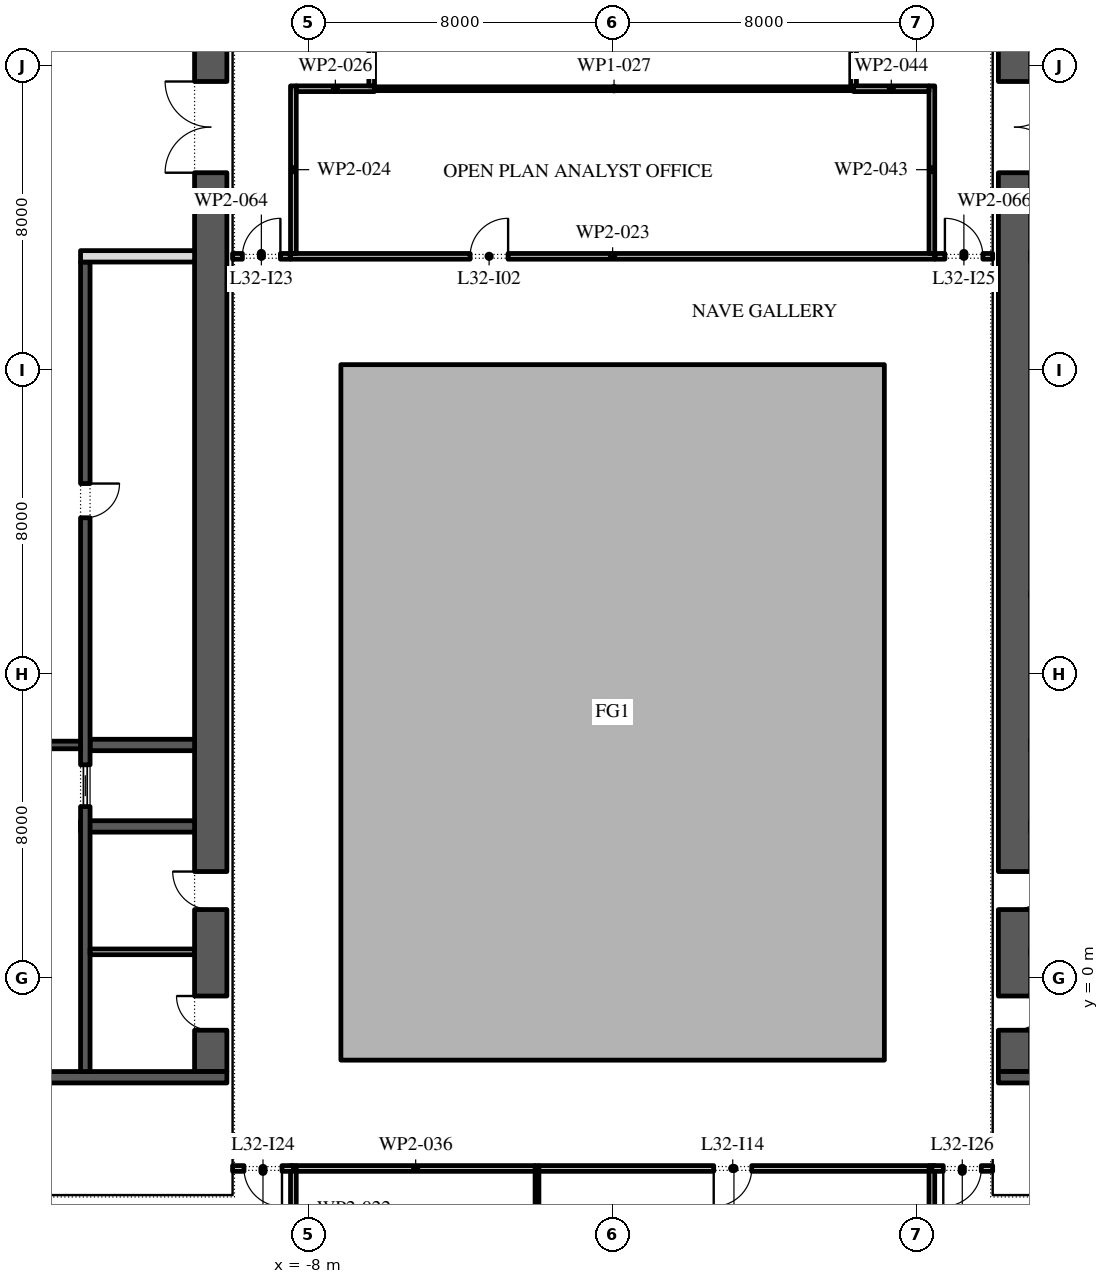
"""IFC4 building model, lengths in metres.
Left out: names, types, materials, properties, quantities, classifications, styles, units other than length and angle.
Written with IfcOpenShell. Run it as: python <this file> out.ifc"""

import sys

from ifc_helpers import new_model, si_unit, direction, frame, frame_2d, origin, place, context, subcontext, project, spatial, polyline, rectangle, outline, extrude, element, fill, save


model = new_model("IFC4")
c1 = context("Model", 3, precision=1e-05, world=origin(), true_north=direction((0.0, 1.0)))
c2 = subcontext(c1, "Body", "Model", "MODEL_VIEW")
j1 = project(units=[si_unit("LENGTHUNIT", "METRE"), si_unit("PLANEANGLEUNIT", "RADIAN")], contexts=[c1])
p1 = place(None, origin())
s1 = spatial("IfcSite", under=j1, at=p1, CompositionType="ELEMENT")
p2 = place(p1, origin())
s2 = spatial("IfcBuilding", under=s1, at=p2, CompositionType="ELEMENT")
p3 = place(p2, frame((0.0, 0.0, 147.6)))
s3 = spatial("IfcBuildingStorey", under=s2, at=p3, CompositionType="ELEMENT", Elevation=147.6)
p4 = place(p3, origin())
e1 = element("IfcWall", 1, at=p4, inside=s3, PredefinedType="STANDARD", context=c2, shape_type="SweptSolid", body=[
    extrude(outline(polyline([(-7.15, -2.15), (7.15, -2.15), (7.15, 16.15), (-7.15, 16.15), (-7.15, -2.15)]), holes=[polyline([(-7.0, -2.0), (-7.0, 16.0), (7.0, 16.0), (7.0, -2.0), (-7.0, -2.0)])]), origin(), (0.0, 0.0, 1.0), 4.0),
])
p5 = place(p3, frame((-10.575, -2.45, 0.0), z_axis=(0.0, 0.0, 1.0), x_axis=(0.0, 1.0, 0.0)))
e2 = element("IfcWall", 2, at=p5, inside=s3, PredefinedType="SHEAR", context=c2, shape_type="SweptSolid", body=[
    extrude(rectangle(XDim=27.9, YDim=0.85, at=frame_2d((13.95, 0.0))), origin(), (0.0, 0.0, 1.0), 4.0),
])
p6 = place(p5, frame((23.65, 0.0, 0.0)))
e3 = element("IfcOpeningElement", 3, at=p6, cuts=e2, PredefinedType="OPENING", context=c2, shape_type="SweptSolid", body=[
    extrude(rectangle(XDim=2.4, YDim=2.1, at=frame_2d((1.2, 1.05))), frame((0.0, 0.435, 0.0), z_axis=(0.0, -1.0, 0.0), x_axis=(1.0, 0.0, 0.0)), (0.0, 0.0, 1.0), 0.87),
])
p7 = place(p5, frame((1.087, 0.0, 0.0)))
e4 = element("IfcOpeningElement", 4, at=p7, cuts=e2, PredefinedType="OPENING", context=c2, shape_type="SweptSolid", body=[
    extrude(rectangle(XDim=0.9, YDim=2.1, at=frame_2d((0.45, 1.05))), frame((0.0, 0.435, 0.0), z_axis=(0.0, -1.0, 0.0), x_axis=(1.0, 0.0, 0.0)), (0.0, 0.0, 1.0), 0.87),
])
p8 = place(p5, frame((4.262, 0.0, 0.0)))
e5 = element("IfcOpeningElement", 5, at=p8, cuts=e2, PredefinedType="OPENING", context=c2, shape_type="SweptSolid", body=[
    extrude(rectangle(XDim=1.0, YDim=2.1, at=frame_2d((0.5, 1.05))), frame((0.0, 0.435, 0.0), z_axis=(0.0, -1.0, 0.0), x_axis=(1.0, 0.0, 0.0)), (0.0, 0.0, 1.0), 0.87),
])
p9 = place(p3, frame((-21.85, -2.6, 0.0), z_axis=(0.0, 0.0, 1.0), x_axis=(1.0, 0.0, 0.0)))
e6 = element("IfcWall", 6, at=p9, inside=s3, PredefinedType="SHEAR", context=c2, shape_type="SweptSolid", body=[
    extrude(rectangle(XDim=11.7, YDim=0.3, at=frame_2d((5.85, 0.0))), origin(), (0.0, 0.0, 1.0), 4.0),
])
p10 = place(p3, frame((-14.0, 4.0, 0.0), z_axis=(0.0, 0.0, 1.0), x_axis=(1.0, 0.0, 0.0)))
e7 = element("IfcWall", 7, at=p10, inside=s3, PredefinedType="SHEAR", context=c2, shape_type="SweptSolid", body=[
    extrude(rectangle(XDim=3.0, YDim=0.3, at=frame_2d((1.5, 0.0))), origin(), (0.0, 0.0, 1.0), 4.0),
])
p11 = place(p3, frame((-13.75, 6.143, 0.0), z_axis=(0.0, 0.0, 1.0), x_axis=(1.0, 0.0, 0.0)))
e8 = element("IfcWall", 8, at=p11, inside=s3, PredefinedType="SHEAR", context=c2, shape_type="SweptSolid", body=[
    extrude(rectangle(XDim=2.75, YDim=0.3, at=frame_2d((1.375, 0.0))), origin(), (0.0, 0.0, 1.0), 4.0),
])
p12 = place(p3, frame((-13.875, -2.45, 0.0), z_axis=(0.0, 0.0, 1.0), x_axis=(0.0, 1.0, 0.0)))
e9 = element("IfcWall", 9, at=p12, inside=s3, PredefinedType="SHEAR", context=c2, shape_type="SweptSolid", body=[
    extrude(rectangle(XDim=21.3, YDim=0.25, at=frame_2d((10.65, 0.0))), origin(), (0.0, 0.0, 1.0), 4.0),
])
p13 = place(p12, frame((14.571, 0.0, 0.0)))
e10 = element("IfcOpeningElement", 10, at=p13, cuts=e9, PredefinedType="OPENING", context=c2, shape_type="SweptSolid", body=[
    extrude(rectangle(XDim=0.9, YDim=2.1, at=frame_2d((0.45, 1.05))), frame((0.0, 0.135, 0.0), z_axis=(0.0, -1.0, 0.0), x_axis=(1.0, 0.0, 0.0)), (0.0, 0.0, 1.0), 0.27),
])
p14 = place(p12, frame((6.971, 0.0, 0.0)))
e11 = element("IfcOpeningElement", 11, at=p14, cuts=e9, PredefinedType="OPENING", context=c2, shape_type="SweptSolid", body=[
    extrude(rectangle(XDim=1.1, YDim=2.1, at=frame_2d((0.55, 1.05))), frame((0.0, 0.135, 0.0), z_axis=(0.0, -1.0, 0.0), x_axis=(1.0, 0.0, 0.0)), (0.0, 0.0, 1.0), 0.27),
])
p15 = place(p3, frame((-14.0, 19.0, 0.0), z_axis=(0.0, 0.0, 1.0), x_axis=(1.0, 0.0, 0.0)))
e12 = element("IfcWall", 12, at=p15, inside=s3, PredefinedType="PARTITIONING", context=c2, shape_type="SweptSolid", body=[
    extrude(rectangle(XDim=3.0, YDim=0.3, at=frame_2d((1.5, 0.0))), origin(), (0.0, 0.0, 1.0), 4.0),
])
p16 = place(p3, frame((-18.0, 6.143, 0.0), z_axis=(0.0, 0.0, 1.0), x_axis=(1.0, 0.0, 0.0)))
e13 = element("IfcWall", 13, at=p16, inside=s3, PredefinedType="SHEAR", context=c2, shape_type="SweptSolid", body=[
    extrude(rectangle(XDim=4.0, YDim=0.2, at=frame_2d((2.0, 0.0))), origin(), (0.0, 0.0, 1.0), 4.0),
])
p17 = place(p16, frame((1.4, 0.0, 0.0)))
e14 = element("IfcOpeningElement", 14, at=p17, cuts=e13, PredefinedType="OPENING", context=c2, shape_type="SweptSolid", body=[
    extrude(rectangle(XDim=1.2, YDim=2.1, at=frame_2d((0.6, 1.05))), frame((0.0, 0.11, 0.0), z_axis=(0.0, -1.0, 0.0), x_axis=(1.0, 0.0, 0.0)), (0.0, 0.0, 1.0), 0.22),
])
p18 = place(p3, frame((-13.75, 0.7, 0.0), z_axis=(0.0, 0.0, 1.0), x_axis=(1.0, 0.0, 0.0)))
e15 = element("IfcWall", 15, at=p18, inside=s3, PredefinedType="PARTITIONING", context=c2, shape_type="SweptSolid", body=[
    extrude(rectangle(XDim=2.75, YDim=0.15, at=frame_2d((1.375, 0.0))), origin(), (0.0, 0.0, 1.0), 4.0),
])
p19 = place(p3, frame((10.575, -2.45, 0.0), z_axis=(0.0, 0.0, 1.0), x_axis=(0.0, 1.0, 0.0)))
e16 = element("IfcWall", 16, at=p19, inside=s3, PredefinedType="SHEAR", context=c2, shape_type="SweptSolid", body=[
    extrude(rectangle(XDim=27.9, YDim=0.85, at=frame_2d((13.95, 0.0))), origin(), (0.0, 0.0, 1.0), 4.0),
])
p20 = place(p19, frame((23.65, 0.0, 0.0)))
e17 = element("IfcOpeningElement", 17, at=p20, cuts=e16, PredefinedType="OPENING", context=c2, shape_type="SweptSolid", body=[
    extrude(rectangle(XDim=2.4, YDim=2.1, at=frame_2d((1.2, 1.05))), frame((0.0, 0.435, 0.0), z_axis=(0.0, -1.0, 0.0), x_axis=(1.0, 0.0, 0.0)), (0.0, 0.0, 1.0), 0.87),
])
p21 = place(p19, frame((1.087, 0.0, 0.0)))
e18 = element("IfcOpeningElement", 18, at=p21, cuts=e16, PredefinedType="OPENING", context=c2, shape_type="SweptSolid", body=[
    extrude(rectangle(XDim=0.9, YDim=2.1, at=frame_2d((0.45, 1.05))), frame((0.0, 0.435, 0.0), z_axis=(0.0, -1.0, 0.0), x_axis=(1.0, 0.0, 0.0)), (0.0, 0.0, 1.0), 0.87),
])
p22 = place(p19, frame((4.262, 0.0, 0.0)))
e19 = element("IfcOpeningElement", 19, at=p22, cuts=e16, PredefinedType="OPENING", context=c2, shape_type="SweptSolid", body=[
    extrude(rectangle(XDim=1.0, YDim=2.1, at=frame_2d((0.5, 1.05))), frame((0.0, 0.435, 0.0), z_axis=(0.0, -1.0, 0.0), x_axis=(1.0, 0.0, 0.0)), (0.0, 0.0, 1.0), 0.87),
])
p23 = place(p3, frame((10.15, -2.6, 0.0), z_axis=(0.0, 0.0, 1.0), x_axis=(1.0, 0.0, 0.0)))
e20 = element("IfcWall", 20, at=p23, inside=s3, PredefinedType="SHEAR", context=c2, shape_type="SweptSolid", body=[
    extrude(rectangle(XDim=11.7, YDim=0.3, at=frame_2d((5.85, 0.0))), origin(), (0.0, 0.0, 1.0), 4.0),
])
p24 = place(p3, frame((-8.4, -4.925, 0.0), z_axis=(0.0, 0.0, 1.0), x_axis=(0.0, -1.0, 0.0)))
e21 = element("IfcWall", 21, at=p24, inside=s3, PredefinedType="PARTITIONING", context=c2, shape_type="SweptSolid", body=[
    extrude(rectangle(XDim=2.3, YDim=0.15, at=frame_2d((1.15, 0.0))), origin(), (0.0, 0.0, 1.0), 4.0),
])
p25 = place(p3, frame((-8.475, 19.0, 0.0), z_axis=(0.0, 0.0, 1.0), x_axis=(1.0, 0.0, 0.0)))
e22 = element("IfcWall", 22, at=p25, inside=s3, PredefinedType="PARTITIONING", context=c2, shape_type="SweptSolid", body=[
    extrude(rectangle(XDim=16.95, YDim=0.15, at=frame_2d((8.475, 0.0))), origin(), (0.0, 0.0, 1.0), 4.0),
])
p26 = place(p25, frame((4.725, 0.0, 0.0)))
e23 = element("IfcOpeningElement", 23, at=p26, cuts=e22, PredefinedType="OPENING", context=c2, shape_type="SweptSolid", body=[
    extrude(rectangle(XDim=1.0, YDim=2.1, at=frame_2d((0.5, 1.05))), frame((0.0, 0.085, 0.0), z_axis=(0.0, -1.0, 0.0), x_axis=(1.0, 0.0, 0.0)), (0.0, 0.0, 1.0), 0.17),
])
p27 = place(p3, frame((-8.4, 23.485, 0.0), z_axis=(0.0, 0.0, 1.0), x_axis=(0.0, -1.0, 0.0)))
e24 = element("IfcWall", 24, at=p27, inside=s3, PredefinedType="PARTITIONING", context=c2, shape_type="SweptSolid", body=[
    extrude(rectangle(XDim=4.41, YDim=0.15, at=frame_2d((2.205, 0.0))), origin(), (0.0, 0.0, 1.0), 4.0),
])
p28 = place(p3, frame((-6.265, 23.41, 0.0), z_axis=(0.0, 0.0, 1.0), x_axis=(-1.0, 0.0, 0.0)))
e25 = element("IfcWall", 25, at=p28, inside=s3, PredefinedType="PARTITIONING", context=c2, shape_type="SweptSolid", body=[
    extrude(rectangle(XDim=2.06, YDim=0.15, at=frame_2d((1.03, 0.0))), origin(), (0.0, 0.0, 1.0), 4.0),
])
p29 = place(p3, frame((-6.265, 23.41, 0.0), z_axis=(0.0, 0.0, 1.0), x_axis=(1.0, 0.0, 0.0)))
e26 = element("IfcWall", 26, at=p29, inside=s3, PredefinedType="PARTITIONING", context=c2, shape_type="SweptSolid", body=[
    extrude(rectangle(XDim=12.605, YDim=0.1, at=frame_2d((6.302, 0.0))), origin(), (0.0, 0.0, 1.0), 4.0),
])
p30 = place(p3, frame((-6.34, 26.965, 0.0), z_axis=(0.0, 0.0, 1.0), x_axis=(0.0, -1.0, 0.0)))
e27 = element("IfcWall", 27, at=p30, inside=s3, PredefinedType="PARTITIONING", context=c2, shape_type="SweptSolid", body=[
    extrude(rectangle(XDim=3.48, YDim=0.15, at=frame_2d((1.74, 0.0))), origin(), (0.0, 0.0, 1.0), 4.0),
])
p31 = place(p30, frame((0.905, 0.0, 0.0)))
e28 = element("IfcOpeningElement", 28, at=p31, cuts=e27, PredefinedType="OPENING", context=c2, shape_type="SweptSolid", body=[
    extrude(rectangle(XDim=1.0, YDim=2.1, at=frame_2d((0.5, 1.05))), frame((0.0, 0.085, 0.0), z_axis=(0.0, -1.0, 0.0), x_axis=(1.0, 0.0, 0.0)), (0.0, 0.0, 1.0), 0.17),
])
p32 = place(p3, frame((-1.99, -11.2, 0.0), z_axis=(0.0, 0.0, 1.0), x_axis=(0.0, 1.0, 0.0)))
e29 = element("IfcWall", 29, at=p32, inside=s3, PredefinedType="PARTITIONING", context=c2, shape_type="SweptSolid", body=[
    extrude(rectangle(XDim=6.275, YDim=0.1, at=frame_2d((3.137, 0.0))), origin(), (0.0, 0.0, 1.0), 3.02),
])
p33 = place(p3, frame((-2.04, -5.0, 0.0), z_axis=(0.0, 0.0, 1.0), x_axis=(-1.0, 0.0, 0.0)))
e30 = element("IfcWall", 30, at=p33, inside=s3, PredefinedType="PARTITIONING", context=c2, shape_type="SweptSolid", body=[
    extrude(rectangle(XDim=6.285, YDim=0.15, at=frame_2d((3.143, 0.0))), origin(), (0.0, 0.0, 1.0), 4.0),
])
p34 = place(p3, frame((6.34, 23.46, 0.0), z_axis=(0.0, 0.0, 1.0), x_axis=(0.0, 1.0, 0.0)))
e31 = element("IfcWall", 31, at=p34, inside=s3, PredefinedType="PARTITIONING", context=c2, shape_type="SweptSolid", body=[
    extrude(rectangle(XDim=3.655, YDim=0.15, at=frame_2d((1.828, 0.0))), origin(), (0.0, 0.0, 1.0), 4.0),
])
p35 = place(p3, frame((8.4, -7.375, 0.0), z_axis=(0.0, 0.0, 1.0), x_axis=(0.0, 1.0, 0.0)))
e32 = element("IfcWall", 32, at=p35, inside=s3, PredefinedType="PARTITIONING", context=c2, shape_type="SweptSolid", body=[
    extrude(rectangle(XDim=2.45, YDim=0.15, at=frame_2d((1.225, 0.0))), origin(), (0.0, 0.0, 1.0), 4.0),
])
p36 = place(p3, frame((8.325, -5.0, 0.0), z_axis=(0.0, 0.0, 1.0), x_axis=(-1.0, 0.0, 0.0)))
e33 = element("IfcWall", 33, at=p36, inside=s3, PredefinedType="PARTITIONING", context=c2, shape_type="SweptSolid", body=[
    extrude(rectangle(XDim=10.265, YDim=0.15, at=frame_2d((5.132, 0.0))), origin(), (0.0, 0.0, 1.0), 4.0),
])
p37 = place(p36, frame((4.665, 0.0, 0.0)))
e34 = element("IfcOpeningElement", 34, at=p37, cuts=e33, PredefinedType="OPENING", context=c2, shape_type="SweptSolid", body=[
    extrude(rectangle(XDim=1.0, YDim=2.1, at=frame_2d((0.5, 1.05))), frame((0.0, 0.085, 0.0), z_axis=(0.0, -1.0, 0.0), x_axis=(1.0, 0.0, 0.0)), (0.0, 0.0, 1.0), 0.17),
])
p38 = place(p3, frame((8.4, 19.075, 0.0), z_axis=(0.0, 0.0, 1.0), x_axis=(0.0, 1.0, 0.0)))
e35 = element("IfcWall", 35, at=p38, inside=s3, PredefinedType="PARTITIONING", context=c2, shape_type="SweptSolid", body=[
    extrude(rectangle(XDim=4.41, YDim=0.15, at=frame_2d((2.205, 0.0))), origin(), (0.0, 0.0, 1.0), 4.0),
])
p39 = place(p3, frame((8.325, 23.41, 0.0), z_axis=(0.0, 0.0, 1.0), x_axis=(-1.0, 0.0, 0.0)))
e36 = element("IfcWall", 36, at=p39, inside=s3, PredefinedType="PARTITIONING", context=c2, shape_type="SweptSolid", body=[
    extrude(rectangle(XDim=1.985, YDim=0.15, at=frame_2d((0.992, 0.0))), origin(), (0.0, 0.0, 1.0), 4.0),
])
p40 = place(p3, frame((-10.0, 19.0, 0.0), z_axis=(0.0, 0.0, 1.0), x_axis=(1.0, 0.0, 0.0)))
e37 = element("IfcWall", 37, at=p40, inside=s3, PredefinedType="PARTITIONING", context=c2, shape_type="SweptSolid", body=[
    extrude(rectangle(XDim=1.515, YDim=0.15, at=frame_2d((0.757, 0.0))), origin(), (0.0, 0.0, 1.0), 4.0),
])
p41 = place(p40, frame((0.258, 0.0, 0.0)))
e38 = element("IfcOpeningElement", 38, at=p41, cuts=e37, PredefinedType="OPENING", context=c2, shape_type="SweptSolid", body=[
    extrude(rectangle(XDim=1.0, YDim=2.1, at=frame_2d((0.5, 1.05))), frame((0.0, 0.085, 0.0), z_axis=(0.0, -1.0, 0.0), x_axis=(1.0, 0.0, 0.0)), (0.0, 0.0, 1.0), 0.17),
])
p42 = place(p3, frame((-8.4, -5.0, 0.0), z_axis=(0.0, 0.0, 1.0), x_axis=(-1.0, 0.0, 0.0)))
e39 = element("IfcWall", 39, at=p42, inside=s3, PredefinedType="PARTITIONING", context=c2, shape_type="SweptSolid", body=[
    extrude(rectangle(XDim=1.6, YDim=0.15, at=frame_2d((0.8, 0.0))), origin(), (0.0, 0.0, 1.0), 4.0),
])
p43 = place(p42, frame((0.3, 0.0, 0.0)))
e40 = element("IfcOpeningElement", 40, at=p43, cuts=e39, PredefinedType="OPENING", context=c2, shape_type="SweptSolid", body=[
    extrude(rectangle(XDim=1.0, YDim=2.1, at=frame_2d((0.5, 1.05))), frame((0.0, 0.085, 0.0), z_axis=(0.0, -1.0, 0.0), x_axis=(1.0, 0.0, 0.0)), (0.0, 0.0, 1.0), 0.17),
])
p44 = place(p3, frame((8.485, 19.0, 0.0), z_axis=(0.0, 0.0, 1.0), x_axis=(1.0, 0.0, 0.0)))
e41 = element("IfcWall", 41, at=p44, inside=s3, PredefinedType="PARTITIONING", context=c2, shape_type="SweptSolid", body=[
    extrude(rectangle(XDim=1.515, YDim=0.15, at=frame_2d((0.757, 0.0))), origin(), (0.0, 0.0, 1.0), 4.0),
])
p45 = place(p44, frame((0.258, 0.0, 0.0)))
e42 = element("IfcOpeningElement", 42, at=p45, cuts=e41, PredefinedType="OPENING", context=c2, shape_type="SweptSolid", body=[
    extrude(rectangle(XDim=1.0, YDim=2.1, at=frame_2d((0.5, 1.05))), frame((0.0, 0.085, 0.0), z_axis=(0.0, -1.0, 0.0), x_axis=(1.0, 0.0, 0.0)), (0.0, 0.0, 1.0), 0.17),
])
p46 = place(p3, frame((10.0, -5.0, 0.0), z_axis=(0.0, 0.0, 1.0), x_axis=(-1.0, 0.0, 0.0)))
e43 = element("IfcWall", 43, at=p46, inside=s3, PredefinedType="PARTITIONING", context=c2, shape_type="SweptSolid", body=[
    extrude(rectangle(XDim=1.6, YDim=0.15, at=frame_2d((0.8, 0.0))), origin(), (0.0, 0.0, 1.0), 4.0),
])
p47 = place(p46, frame((0.3, 0.0, 0.0)))
e44 = element("IfcOpeningElement", 44, at=p47, cuts=e43, PredefinedType="OPENING", context=c2, shape_type="SweptSolid", body=[
    extrude(rectangle(XDim=1.0, YDim=2.1, at=frame_2d((0.5, 1.05))), frame((0.0, 0.085, 0.0), z_axis=(0.0, -1.0, 0.0), x_axis=(1.0, 0.0, 0.0)), (0.0, 0.0, 1.0), 0.17),
])
p48 = place(p13, frame((0.9, -0.2, 0.0), z_axis=(0.0, 0.0, 1.0), x_axis=(-1.0, 0.0, 0.0)))
e45 = element("IfcDoor", 45, at=p48, inside=s3, OperationType="SINGLE_SWING_RIGHT", PredefinedType="DOOR", context=c2, shape_type="SweptSolid", body=[
    extrude(rectangle(XDim=0.9, YDim=2.1, at=frame_2d((0.45, 1.05))), frame((0.0, -0.075, 0.0), z_axis=(0.0, -1.0, 0.0), x_axis=(1.0, 0.0, 0.0)), (0.0, 0.0, 1.0), 0.05),
])
fill(e10, e45)
p49 = place(p14, origin())
e46 = element("IfcDoor", 46, at=p49, inside=s3, OperationType="SLIDING_TO_LEFT", PredefinedType="DOOR", context=c2, shape_type="SweptSolid", body=[
    extrude(rectangle(XDim=1.1, YDim=2.1, at=frame_2d((0.55, 1.05))), frame((0.0, 0.025, 0.0), z_axis=(0.0, -1.0, 0.0), x_axis=(1.0, 0.0, 0.0)), (0.0, 0.0, 1.0), 0.05),
])
fill(e11, e46)
p50 = place(p6, origin())
e47 = element("IfcDoor", 47, at=p50, inside=s3, OperationType="DOUBLE_DOOR_SINGLE_SWING", PredefinedType="DOOR", context=c2, shape_type="SweptSolid", body=[
    extrude(rectangle(XDim=2.4, YDim=2.1, at=frame_2d((1.2, 1.05))), frame((0.0, 0.025, 0.0), z_axis=(0.0, -1.0, 0.0), x_axis=(1.0, 0.0, 0.0)), (0.0, 0.0, 1.0), 0.05),
])
fill(e3, e47)
p51 = place(p7, origin())
e48 = element("IfcDoor", 48, at=p51, inside=s3, OperationType="SINGLE_SWING_LEFT", PredefinedType="DOOR", context=c2, shape_type="SweptSolid", body=[
    extrude(rectangle(XDim=0.9, YDim=2.1, at=frame_2d((0.45, 1.05))), frame((0.0, 0.425, 0.0), z_axis=(0.0, -1.0, 0.0), x_axis=(1.0, 0.0, 0.0)), (0.0, 0.0, 1.0), 0.05),
])
fill(e4, e48)
p52 = place(p8, origin())
e49 = element("IfcDoor", 49, at=p52, inside=s3, OperationType="SINGLE_SWING_LEFT", PredefinedType="DOOR", context=c2, shape_type="SweptSolid", body=[
    extrude(rectangle(XDim=1.0, YDim=2.1, at=frame_2d((0.5, 1.05))), frame((0.0, 0.425, 0.0), z_axis=(0.0, -1.0, 0.0), x_axis=(1.0, 0.0, 0.0)), (0.0, 0.0, 1.0), 0.05),
])
fill(e5, e49)
p53 = place(p20, frame((2.4, 0.0, 0.0), z_axis=(0.0, 0.0, 1.0), x_axis=(-1.0, 0.0, 0.0)))
e50 = element("IfcDoor", 50, at=p53, inside=s3, OperationType="DOUBLE_DOOR_SINGLE_SWING", PredefinedType="DOOR", context=c2, shape_type="SweptSolid", body=[
    extrude(rectangle(XDim=2.4, YDim=2.1, at=frame_2d((1.2, 1.05))), frame((0.0, 0.025, 0.0), z_axis=(0.0, -1.0, 0.0), x_axis=(1.0, 0.0, 0.0)), (0.0, 0.0, 1.0), 0.05),
])
fill(e17, e50)
p54 = place(p21, frame((0.9, -0.8, 0.0), z_axis=(0.0, 0.0, 1.0), x_axis=(-1.0, 0.0, 0.0)))
e51 = element("IfcDoor", 51, at=p54, inside=s3, OperationType="SINGLE_SWING_RIGHT", PredefinedType="DOOR", context=c2, shape_type="SweptSolid", body=[
    extrude(rectangle(XDim=0.9, YDim=2.1, at=frame_2d((0.45, 1.05))), frame((0.0, -0.375, 0.0), z_axis=(0.0, -1.0, 0.0), x_axis=(1.0, 0.0, 0.0)), (0.0, 0.0, 1.0), 0.05),
])
fill(e18, e51)
p55 = place(p22, frame((1.0, -0.8, 0.0), z_axis=(0.0, 0.0, 1.0), x_axis=(-1.0, 0.0, 0.0)))
e52 = element("IfcDoor", 52, at=p55, inside=s3, OperationType="SINGLE_SWING_RIGHT", PredefinedType="DOOR", context=c2, shape_type="SweptSolid", body=[
    extrude(rectangle(XDim=1.0, YDim=2.1, at=frame_2d((0.5, 1.05))), frame((0.0, -0.375, 0.0), z_axis=(0.0, -1.0, 0.0), x_axis=(1.0, 0.0, 0.0)), (0.0, 0.0, 1.0), 0.05),
])
fill(e19, e52)
p56 = place(p26, origin())
e53 = element("IfcDoor", 53, at=p56, inside=s3, OperationType="SINGLE_SWING_LEFT", PredefinedType="DOOR", context=c2, shape_type="SweptSolid", body=[
    extrude(rectangle(XDim=1.0, YDim=2.1, at=frame_2d((0.5, 1.05))), frame((0.0, 0.025, 0.0), z_axis=(0.0, -1.0, 0.0), x_axis=(1.0, 0.0, 0.0)), (0.0, 0.0, 1.0), 0.05),
])
fill(e23, e53)
p57 = place(p37, origin())
e54 = element("IfcDoor", 54, at=p57, inside=s3, OperationType="SINGLE_SWING_LEFT", PredefinedType="DOOR", context=c2, shape_type="SweptSolid", body=[
    extrude(rectangle(XDim=1.0, YDim=2.1, at=frame_2d((0.5, 1.05))), frame((0.0, 0.025, 0.0), z_axis=(0.0, -1.0, 0.0), x_axis=(1.0, 0.0, 0.0)), (0.0, 0.0, 1.0), 0.05),
])
fill(e34, e54)
p58 = place(p41, origin())
e55 = element("IfcDoor", 55, at=p58, inside=s3, OperationType="SINGLE_SWING_LEFT", PredefinedType="DOOR", context=c2, shape_type="SweptSolid", body=[
    extrude(rectangle(XDim=1.0, YDim=2.1, at=frame_2d((0.5, 1.05))), frame((0.0, 0.025, 0.0), z_axis=(0.0, -1.0, 0.0), x_axis=(1.0, 0.0, 0.0)), (0.0, 0.0, 1.0), 0.05),
])
fill(e38, e55)
p59 = place(p43, origin())
e56 = element("IfcDoor", 56, at=p59, inside=s3, OperationType="SINGLE_SWING_RIGHT", PredefinedType="DOOR", context=c2, shape_type="SweptSolid", body=[
    extrude(rectangle(XDim=1.0, YDim=2.1, at=frame_2d((0.5, 1.05))), frame((0.0, 0.025, 0.0), z_axis=(0.0, -1.0, 0.0), x_axis=(1.0, 0.0, 0.0)), (0.0, 0.0, 1.0), 0.05),
])
fill(e40, e56)
p60 = place(p45, origin())
e57 = element("IfcDoor", 57, at=p60, inside=s3, OperationType="SINGLE_SWING_RIGHT", PredefinedType="DOOR", context=c2, shape_type="SweptSolid", body=[
    extrude(rectangle(XDim=1.0, YDim=2.1, at=frame_2d((0.5, 1.05))), frame((0.0, 0.025, 0.0), z_axis=(0.0, -1.0, 0.0), x_axis=(1.0, 0.0, 0.0)), (0.0, 0.0, 1.0), 0.05),
])
fill(e42, e57)
p61 = place(p47, origin())
e58 = element("IfcDoor", 58, at=p61, inside=s3, OperationType="SINGLE_SWING_LEFT", PredefinedType="DOOR", context=c2, shape_type="SweptSolid", body=[
    extrude(rectangle(XDim=1.0, YDim=2.1, at=frame_2d((0.5, 1.05))), frame((0.0, 0.025, 0.0), z_axis=(0.0, -1.0, 0.0), x_axis=(1.0, 0.0, 0.0)), (0.0, 0.0, 1.0), 0.05),
])
fill(e44, e58)
save(model, sys.argv[1])
